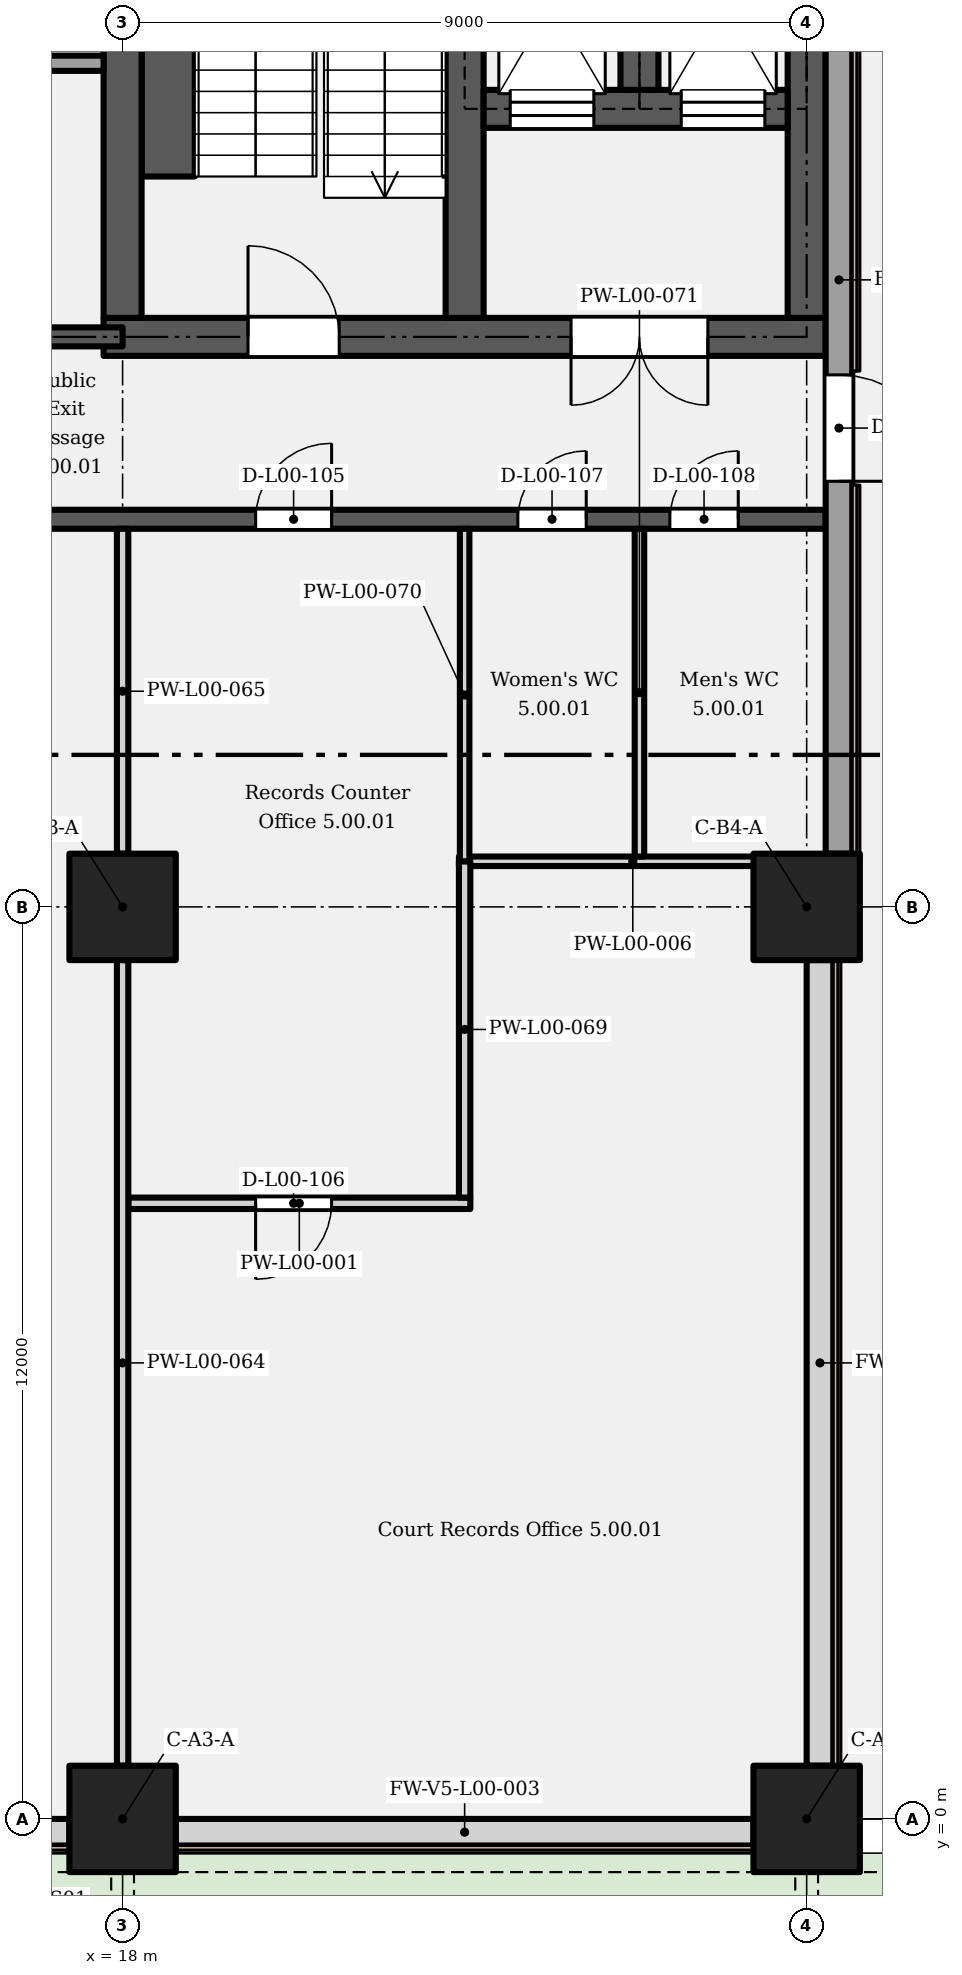
"""IFC4 building model, lengths in metres.
Left out: names, types, materials, properties, quantities, classifications, styles, units other than length and angle.
Written with IfcOpenShell. Run it as: python <this file> out.ifc"""

import sys

from ifc_helpers import new_model, si_unit, direction, frame, frame_2d, origin, origin_2d, place, context, subcontext, project, spatial, rectangle, extrude, element, fill, save


model = new_model("IFC4")
c1 = context("Model", 3, precision=1e-05, world=origin(), true_north=direction((0.0, 1.0)))
c2 = subcontext(c1, "Body", "Model", "MODEL_VIEW")
j1 = project(units=[si_unit("LENGTHUNIT", "METRE"), si_unit("PLANEANGLEUNIT", "RADIAN")], contexts=[c1])
p1 = place(None, origin())
s1 = spatial("IfcSite", under=j1, at=p1, CompositionType="ELEMENT")
p2 = place(p1, origin())
s2 = spatial("IfcBuilding", under=s1, at=p2, CompositionType="ELEMENT")
p3 = place(p2, origin())
s3 = spatial("IfcBuildingStorey", under=s2, at=p3, CompositionType="ELEMENT", Elevation=0.0)
for number, where, z_axis, x_axis in (
    (1, (18.0, 0.0, 0.0), (0.0, 0.0, 1.0), (1.0, 0.0, 0.0)),
    (2, (27.0, 0.0, 0.0), (0.0, 0.0, 1.0), (1.0, 0.0, 0.0)),
    (3, (18.0, 12.0, 0.0), (0.0, 0.0, 1.0), (1.0, 0.0, 0.0)),
    (4, (27.0, 12.0, 0.0), (0.0, 0.0, 1.0), (1.0, 0.0, 0.0)),
):
    element("IfcColumn", number, at=place(p3, frame(where, z_axis=z_axis, x_axis=x_axis)), inside=s3, PredefinedType="COLUMN", context=c2, shape_type="SweptSolid", body=[
        extrude(rectangle(XDim=1.4, YDim=1.4, at=origin_2d()), origin(), (0.0, 0.0, 1.0), 6.6),
    ])
p4 = place(p3, frame((17.75, 19.5, 0.0), z_axis=(0.0, 0.0, 1.0), x_axis=(1.0, 0.0, 0.0)))
e5 = element("IfcWall", 5, at=p4, inside=s3, PredefinedType="SHEAR", context=c2, shape_type="SweptSolid", body=[
    extrude(rectangle(XDim=9.5, YDim=0.5, at=frame_2d((4.75, 0.0))), origin(), (0.0, 0.0, 1.0), 6.3),
])
p5 = place(p4, frame((1.9, 0.0, 0.0)))
e6 = element("IfcOpeningElement", 6, at=p5, cuts=e5, PredefinedType="OPENING", context=c2, shape_type="SweptSolid", body=[
    extrude(rectangle(XDim=1.2, YDim=2.1, at=frame_2d((0.6, 1.05))), frame((0.0, 0.26, 0.0), z_axis=(0.0, -1.0, 0.0), x_axis=(1.0, 0.0, 0.0)), (0.0, 0.0, 1.0), 0.52),
])
p6 = place(p4, frame((7.95, 0.0, 0.0), z_axis=(0.0, 0.0, 1.0), x_axis=(-1.0, 0.0, 0.0)))
e7 = element("IfcOpeningElement", 7, at=p6, cuts=e5, PredefinedType="OPENING", context=c2, shape_type="SweptSolid", body=[
    extrude(rectangle(XDim=1.8, YDim=2.1, at=frame_2d((0.9, 1.05))), frame((0.0, 0.26, 0.0), z_axis=(0.0, -1.0, 0.0), x_axis=(1.0, 0.0, 0.0)), (0.0, 0.0, 1.0), 0.52),
])
p7 = place(p3, frame((18.0, 19.75, 0.0), z_axis=(0.0, 0.0, 1.0), x_axis=(0.0, 1.0, 0.0)))
e8 = element("IfcWall", 8, at=p7, inside=s3, PredefinedType="SHEAR", context=c2, shape_type="SweptSolid", body=[
    extrude(rectangle(XDim=8.05, YDim=0.5, at=frame_2d((4.025, 0.0))), origin(), (0.0, 0.0, 1.0), 6.3),
])
p8 = place(p3, frame((22.5, 19.75, 0.0), z_axis=(0.0, 0.0, 1.0), x_axis=(0.0, 1.0, 0.0)))
e9 = element("IfcWall", 9, at=p8, inside=s3, PredefinedType="SHEAR", context=c2, shape_type="SweptSolid", body=[
    extrude(rectangle(XDim=8.5, YDim=0.5, at=frame_2d((4.25, 0.0))), origin(), (0.0, 0.0, 1.0), 6.3),
])
p9 = place(p3, frame((27.0, 19.75, 0.0), z_axis=(0.0, 0.0, 1.0), x_axis=(0.0, 1.0, 0.0)))
e10 = element("IfcWall", 10, at=p9, inside=s3, PredefinedType="SHEAR", context=c2, shape_type="SweptSolid", body=[
    extrude(rectangle(XDim=8.05, YDim=0.5, at=frame_2d((4.025, 0.0))), origin(), (0.0, 0.0, 1.0), 6.3),
])
p10 = place(p3, frame((22.75, 22.5, 0.0), z_axis=(0.0, 0.0, 1.0), x_axis=(1.0, 0.0, 0.0)))
e11 = element("IfcWall", 11, at=p10, inside=s3, PredefinedType="SHEAR", context=c2, shape_type="SweptSolid", body=[
    extrude(rectangle(XDim=4.0, YDim=0.5, at=frame_2d((2.0, 0.0))), origin(), (0.0, 0.0, 1.0), 6.3),
])
p11 = place(p10, frame((0.35, 0.0, 0.0)))
e12 = element("IfcOpeningElement", 12, at=p11, cuts=e11, PredefinedType="OPENING", context=c2, shape_type="SweptSolid", body=[
    extrude(rectangle(XDim=1.1, YDim=2.1, at=frame_2d((0.55, 1.05))), frame((0.0, 0.26, 0.0), z_axis=(0.0, -1.0, 0.0), x_axis=(1.0, 0.0, 0.0)), (0.0, 0.0, 1.0), 0.52),
])
p12 = place(p10, frame((2.6, 0.0, 0.0)))
e13 = element("IfcOpeningElement", 13, at=p12, cuts=e11, PredefinedType="OPENING", context=c2, shape_type="SweptSolid", body=[
    extrude(rectangle(XDim=1.1, YDim=2.1, at=frame_2d((0.55, 1.05))), frame((0.0, 0.26, 0.0), z_axis=(0.0, -1.0, 0.0), x_axis=(1.0, 0.0, 0.0)), (0.0, 0.0, 1.0), 0.52),
])
p13 = place(p3, frame((24.8, 22.75, 0.0), z_axis=(0.0, 0.0, 1.0), x_axis=(0.0, 1.0, 0.0)))
e14 = element("IfcWall", 14, at=p13, inside=s3, PredefinedType="SHEAR", context=c2, shape_type="SweptSolid", body=[
    extrude(rectangle(XDim=5.5, YDim=0.5, at=frame_2d((2.75, 0.0))), origin(), (0.0, 0.0, 1.0), 6.3),
])
p14 = place(p3, frame((9.7, -0.175, 0.0), z_axis=(0.0, 0.0, 1.0), x_axis=(1.0, 0.0, 0.0)))
e15 = element("IfcWall", 15, at=p14, inside=s3, PredefinedType="SOLIDWALL", context=c2, shape_type="SweptSolid", body=[
    extrude(rectangle(XDim=7.6, YDim=0.35, at=frame_2d((3.8, 0.0))), origin(), (0.0, 0.0, 1.0), 6.3),
])
p15 = place(p14, frame((4.8, 0.0, 0.0), z_axis=(0.0, 0.0, 1.0), x_axis=(-1.0, 0.0, 0.0)))
e16 = element("IfcOpeningElement", 16, at=p15, cuts=e15, PredefinedType="OPENING", context=c2, shape_type="SweptSolid", body=[
    extrude(rectangle(XDim=2.0, YDim=2.1, at=frame_2d((1.0, 1.05))), frame((0.0, 0.185, 0.0), z_axis=(0.0, -1.0, 0.0), x_axis=(1.0, 0.0, 0.0)), (0.0, 0.0, 1.0), 0.37),
])
p16 = place(p14, frame((2.8, 0.0, 2.25)))
e17 = element("IfcOpeningElement", 17, at=p16, cuts=e15, PredefinedType="OPENING", context=c2, shape_type="SweptSolid", body=[
    extrude(rectangle(XDim=2.0, YDim=0.8, at=frame_2d((1.0, 0.4))), frame((0.0, 0.185, 0.0), z_axis=(0.0, -1.0, 0.0), x_axis=(1.0, 0.0, 0.0)), (0.0, 0.0, 1.0), 0.37),
])
p17 = place(p3, frame((18.7, -0.175, 0.0), z_axis=(0.0, 0.0, 1.0), x_axis=(1.0, 0.0, 0.0)))
e18 = element("IfcWall", 18, at=p17, inside=s3, PredefinedType="SOLIDWALL", context=c2, shape_type="SweptSolid", body=[
    extrude(rectangle(XDim=7.6, YDim=0.35, at=frame_2d((3.8, 0.0))), origin(), (0.0, 0.0, 1.0), 6.3),
])
p18 = place(p3, frame((27.175, 0.7, 0.0), z_axis=(0.0, 0.0, 1.0), x_axis=(0.0, 1.0, 0.0)))
e19 = element("IfcWall", 19, at=p18, inside=s3, PredefinedType="SOLIDWALL", context=c2, shape_type="SweptSolid", body=[
    extrude(rectangle(XDim=10.6, YDim=0.35, at=frame_2d((5.3, 0.0))), origin(), (0.0, 0.0, 1.0), 6.3),
])
p19 = place(p3, frame((27.425, 12.7, 0.0), z_axis=(0.0, 0.0, 1.0), x_axis=(0.0, 1.0, 0.0)))
e20 = element("IfcWall", 20, at=p19, inside=s3, PredefinedType="SOLIDWALL", context=c2, shape_type="SweptSolid", body=[
    extrude(rectangle(XDim=15.1, YDim=0.35, at=frame_2d((7.55, 0.0))), origin(), (0.0, 0.0, 1.0), 6.3),
])
p20 = place(p19, frame((6.3, 0.0, 0.0), z_axis=(0.0, 0.0, 1.0), x_axis=(-1.0, 0.0, 0.0)))
e21 = element("IfcOpeningElement", 21, at=p20, cuts=e20, PredefinedType="OPENING", context=c2, shape_type="SweptSolid", body=[
    extrude(rectangle(XDim=1.4, YDim=2.1, at=frame_2d((0.7, 1.05))), frame((0.0, 0.185, 0.0), z_axis=(0.0, -1.0, 0.0), x_axis=(1.0, 0.0, 0.0)), (0.0, 0.0, 1.0), 0.37),
])
p21 = place(p3, frame((18.075, 8.1, 0.0), z_axis=(0.0, 0.0, 1.0), x_axis=(1.0, 0.0, 0.0)))
e22 = element("IfcWall", 22, at=p21, inside=s3, PredefinedType="PARTITIONING", context=c2, shape_type="SweptSolid", body=[
    extrude(rectangle(XDim=4.5, YDim=0.15, at=frame_2d((2.25, 0.0))), origin(), (0.0, 0.0, 1.0), 6.3),
])
p22 = place(p21, frame((2.675, 0.0, 0.0), z_axis=(0.0, 0.0, 1.0), x_axis=(-1.0, 0.0, 0.0)))
e23 = element("IfcOpeningElement", 23, at=p22, cuts=e22, PredefinedType="OPENING", context=c2, shape_type="SweptSolid", body=[
    extrude(rectangle(XDim=1.0, YDim=2.1, at=frame_2d((0.5, 1.05))), frame((0.0, 0.085, 0.0), z_axis=(0.0, -1.0, 0.0), x_axis=(1.0, 0.0, 0.0)), (0.0, 0.0, 1.0), 0.17),
])
p23 = place(p3, frame((22.425, 12.6, 0.0), z_axis=(0.0, 0.0, 1.0), x_axis=(1.0, 0.0, 0.0)))
e24 = element("IfcWall", 24, at=p23, inside=s3, PredefinedType="PARTITIONING", context=c2, shape_type="SweptSolid", body=[
    extrude(rectangle(XDim=4.575, YDim=0.125, at=frame_2d((2.288, 0.0))), origin(), (0.0, 0.0, 1.0), 6.3),
])
p24 = place(p3, frame((-0.25, 17.1, 0.0), z_axis=(0.0, 0.0, 1.0), x_axis=(1.0, 0.0, 0.0)))
e25 = element("IfcWall", 25, at=p24, inside=s3, PredefinedType="SHEAR", context=c2, shape_type="SweptSolid", body=[
    extrude(rectangle(XDim=27.5, YDim=0.25, at=frame_2d((13.75, 0.0))), origin(), (0.0, 0.0, 1.0), 6.3),
])
p25 = place(p24, frame((4.15, 0.0, 0.0)))
e26 = element("IfcOpeningElement", 26, at=p25, cuts=e25, PredefinedType="OPENING", context=c2, shape_type="SweptSolid", body=[
    extrude(rectangle(XDim=1.2, YDim=2.1, at=frame_2d((0.6, 1.05))), frame((0.0, 0.135, 0.0), z_axis=(0.0, -1.0, 0.0), x_axis=(1.0, 0.0, 0.0)), (0.0, 0.0, 1.0), 0.27),
])
p26 = place(p24, frame((14.25, 0.0, 0.0)))
e27 = element("IfcOpeningElement", 27, at=p26, cuts=e25, PredefinedType="OPENING", context=c2, shape_type="SweptSolid", body=[
    extrude(rectangle(XDim=2.0, YDim=2.1, at=frame_2d((1.0, 1.05))), frame((0.0, 0.135, 0.0), z_axis=(0.0, -1.0, 0.0), x_axis=(1.0, 0.0, 0.0)), (0.0, 0.0, 1.0), 0.27),
])
p27 = place(p24, frame((20.0, 0.0, 0.0)))
e28 = element("IfcOpeningElement", 28, at=p27, cuts=e25, PredefinedType="OPENING", context=c2, shape_type="SweptSolid", body=[
    extrude(rectangle(XDim=1.0, YDim=2.1, at=frame_2d((0.5, 1.05))), frame((0.0, 0.135, 0.0), z_axis=(0.0, -1.0, 0.0), x_axis=(1.0, 0.0, 0.0)), (0.0, 0.0, 1.0), 0.27),
])
p28 = place(p24, frame((23.45, 0.0, 0.0)))
e29 = element("IfcOpeningElement", 29, at=p28, cuts=e25, PredefinedType="OPENING", context=c2, shape_type="SweptSolid", body=[
    extrude(rectangle(XDim=0.9, YDim=2.1, at=frame_2d((0.45, 1.05))), frame((0.0, 0.135, 0.0), z_axis=(0.0, -1.0, 0.0), x_axis=(1.0, 0.0, 0.0)), (0.0, 0.0, 1.0), 0.27),
])
p29 = place(p24, frame((25.45, 0.0, 0.0)))
e30 = element("IfcOpeningElement", 30, at=p29, cuts=e25, PredefinedType="OPENING", context=c2, shape_type="SweptSolid", body=[
    extrude(rectangle(XDim=0.9, YDim=2.1, at=frame_2d((0.45, 1.05))), frame((0.0, 0.135, 0.0), z_axis=(0.0, -1.0, 0.0), x_axis=(1.0, 0.0, 0.0)), (0.0, 0.0, 1.0), 0.27),
])
p30 = place(p3, frame((9.0, 19.5, 0.0), z_axis=(0.0, 0.0, 1.0), x_axis=(1.0, 0.0, 0.0)))
e31 = element("IfcWall", 31, at=p30, inside=s3, PredefinedType="SHEAR", context=c2, shape_type="SweptSolid", body=[
    extrude(rectangle(XDim=9.0, YDim=0.25, at=frame_2d((4.5, 0.0))), origin(), (0.0, 0.0, 1.0), 6.3),
])
p31 = place(p30, frame((2.0, 0.0, 0.0), z_axis=(0.0, 0.0, 1.0), x_axis=(-1.0, 0.0, 0.0)))
e32 = element("IfcOpeningElement", 32, at=p31, cuts=e31, PredefinedType="OPENING", context=c2, shape_type="SweptSolid", body=[
    extrude(rectangle(XDim=1.0, YDim=2.1, at=frame_2d((0.5, 1.05))), frame((0.0, 0.135, 0.0), z_axis=(0.0, -1.0, 0.0), x_axis=(1.0, 0.0, 0.0)), (0.0, 0.0, 1.0), 0.27),
])
p32 = place(p30, frame((7.25, 0.0, 0.0), z_axis=(0.0, 0.0, 1.0), x_axis=(-1.0, 0.0, 0.0)))
e33 = element("IfcOpeningElement", 33, at=p32, cuts=e31, PredefinedType="OPENING", context=c2, shape_type="SweptSolid", body=[
    extrude(rectangle(XDim=1.0, YDim=2.1, at=frame_2d((0.5, 1.05))), frame((0.0, 0.135, 0.0), z_axis=(0.0, -1.0, 0.0), x_axis=(1.0, 0.0, 0.0)), (0.0, 0.0, 1.0), 0.27),
])
p33 = place(p3, frame((13.4, 23.1, 0.0), z_axis=(0.0, 0.0, 1.0), x_axis=(1.0, 0.0, 0.0)))
e34 = element("IfcWall", 34, at=p33, inside=s3, PredefinedType="PARTITIONING", context=c2, shape_type="SweptSolid", body=[
    extrude(rectangle(XDim=4.35, YDim=0.2, at=frame_2d((2.175, 0.0))), origin(), (0.0, 0.0, 1.0), 6.3),
])
p34 = place(p3, frame((18.0, 0.7, 0.0), z_axis=(0.0, 0.0, 1.0), x_axis=(0.0, 1.0, 0.0)))
e35 = element("IfcWall", 35, at=p34, inside=s3, PredefinedType="PARTITIONING", context=c2, shape_type="SweptSolid", body=[
    extrude(rectangle(XDim=10.6, YDim=0.15, at=frame_2d((5.3, 0.0))), origin(), (0.0, 0.0, 1.0), 5.55),
])
p35 = place(p3, frame((18.0, 12.7, 0.0), z_axis=(0.0, 0.0, 1.0), x_axis=(0.0, 1.0, 0.0)))
e36 = element("IfcWall", 36, at=p35, inside=s3, PredefinedType="PARTITIONING", context=c2, shape_type="SweptSolid", body=[
    extrude(rectangle(XDim=4.275, YDim=0.15, at=frame_2d((2.138, 0.0))), origin(), (0.0, 0.0, 1.0), 5.35),
])
p36 = place(p3, frame((22.5, 8.175, 0.0), z_axis=(0.0, 0.0, 1.0), x_axis=(0.0, 1.0, 0.0)))
e37 = element("IfcWall", 37, at=p36, inside=s3, PredefinedType="PARTITIONING", context=c2, shape_type="SweptSolid", body=[
    extrude(rectangle(XDim=4.425, YDim=0.15, at=frame_2d((2.212, 0.0))), origin(), (0.0, 0.0, 1.0), 6.3),
])
p37 = place(p3, frame((22.5, 12.6, 0.0), z_axis=(0.0, 0.0, 1.0), x_axis=(0.0, 1.0, 0.0)))
e38 = element("IfcWall", 38, at=p37, inside=s3, PredefinedType="PARTITIONING", context=c2, shape_type="SweptSolid", body=[
    extrude(rectangle(XDim=4.375, YDim=0.125, at=frame_2d((2.188, 0.0))), origin(), (0.0, 0.0, 1.0), 6.3),
])
p38 = place(p3, frame((24.8, 12.663, 0.0), z_axis=(0.0, 0.0, 1.0), x_axis=(0.0, 1.0, 0.0)))
e39 = element("IfcWall", 39, at=p38, inside=s3, PredefinedType="PARTITIONING", context=c2, shape_type="SweptSolid", body=[
    extrude(rectangle(XDim=4.312, YDim=0.125, at=frame_2d((2.156, 0.0))), origin(), (0.0, 0.0, 1.0), 6.3),
])
p39 = place(p3, frame((18.6, 21.61, 0.0), z_axis=(0.0, 0.0, 1.0), x_axis=(0.0, 1.0, 0.0)))
e40 = element("IfcWall", 40, at=p39, inside=s3, PredefinedType="SHEAR", context=c2, shape_type="SweptSolid", body=[
    extrude(rectangle(XDim=6.14, YDim=0.7, at=frame_2d((3.07, 0.0))), origin(), (0.0, 0.0, 1.0), 3.1),
])
p40 = place(p20, origin())
e41 = element("IfcDoor", 41, at=p40, inside=s3, OperationType="SINGLE_SWING_LEFT", PredefinedType="DOOR", context=c2, shape_type="SweptSolid", body=[
    extrude(rectangle(XDim=1.4, YDim=2.1, at=frame_2d((0.7, 1.05))), frame((0.0, 0.025, 0.0), z_axis=(0.0, -1.0, 0.0), x_axis=(1.0, 0.0, 0.0)), (0.0, 0.0, 1.0), 0.05),
])
fill(e21, e41)
p41 = place(p5, origin())
e42 = element("IfcDoor", 42, at=p41, inside=s3, OperationType="SINGLE_SWING_LEFT", PredefinedType="DOOR", context=c2, shape_type="SweptSolid", body=[
    extrude(rectangle(XDim=1.2, YDim=2.1, at=frame_2d((0.6, 1.05))), frame((0.0, 0.025, 0.0), z_axis=(0.0, -1.0, 0.0), x_axis=(1.0, 0.0, 0.0)), (0.0, 0.0, 1.0), 0.05),
])
fill(e6, e42)
p42 = place(p6, origin())
e43 = element("IfcDoor", 43, at=p42, inside=s3, OperationType="DOUBLE_DOOR_SINGLE_SWING", PredefinedType="DOOR", context=c2, shape_type="SweptSolid", body=[
    extrude(rectangle(XDim=1.8, YDim=2.1, at=frame_2d((0.9, 1.05))), frame((0.0, 0.025, 0.0), z_axis=(0.0, -1.0, 0.0), x_axis=(1.0, 0.0, 0.0)), (0.0, 0.0, 1.0), 0.05),
])
fill(e7, e43)
p43 = place(p11, origin())
e44 = element("IfcDoor", 44, at=p43, inside=s3, OperationType="SLIDING_TO_LEFT", PredefinedType="DOOR", context=c2, shape_type="SweptSolid", body=[
    extrude(rectangle(XDim=1.1, YDim=2.1, at=frame_2d((0.55, 1.05))), frame((0.0, 0.025, 0.0), z_axis=(0.0, -1.0, 0.0), x_axis=(1.0, 0.0, 0.0)), (0.0, 0.0, 1.0), 0.05),
])
fill(e12, e44)
p44 = place(p12, origin())
e45 = element("IfcDoor", 45, at=p44, inside=s3, OperationType="SLIDING_TO_LEFT", PredefinedType="DOOR", context=c2, shape_type="SweptSolid", body=[
    extrude(rectangle(XDim=1.1, YDim=2.1, at=frame_2d((0.55, 1.05))), frame((0.0, 0.025, 0.0), z_axis=(0.0, -1.0, 0.0), x_axis=(1.0, 0.0, 0.0)), (0.0, 0.0, 1.0), 0.05),
])
fill(e13, e45)
p45 = place(p27, origin())
e46 = element("IfcDoor", 46, at=p45, inside=s3, OperationType="SINGLE_SWING_RIGHT", PredefinedType="DOOR", context=c2, shape_type="SweptSolid", body=[
    extrude(rectangle(XDim=1.0, YDim=2.1, at=frame_2d((0.5, 1.05))), frame((0.0, 0.025, 0.0), z_axis=(0.0, -1.0, 0.0), x_axis=(1.0, 0.0, 0.0)), (0.0, 0.0, 1.0), 0.05),
])
fill(e28, e46)
p46 = place(p22, origin())
e47 = element("IfcDoor", 47, at=p46, inside=s3, OperationType="SINGLE_SWING_RIGHT", PredefinedType="DOOR", context=c2, shape_type="SweptSolid", body=[
    extrude(rectangle(XDim=1.0, YDim=2.1, at=frame_2d((0.5, 1.05))), frame((0.0, 0.025, 0.0), z_axis=(0.0, -1.0, 0.0), x_axis=(1.0, 0.0, 0.0)), (0.0, 0.0, 1.0), 0.05),
])
fill(e23, e47)
p47 = place(p28, origin())
e48 = element("IfcDoor", 48, at=p47, inside=s3, OperationType="SINGLE_SWING_RIGHT", PredefinedType="DOOR", context=c2, shape_type="SweptSolid", body=[
    extrude(rectangle(XDim=0.9, YDim=2.1, at=frame_2d((0.45, 1.05))), frame((0.0, 0.025, 0.0), z_axis=(0.0, -1.0, 0.0), x_axis=(1.0, 0.0, 0.0)), (0.0, 0.0, 1.0), 0.05),
])
fill(e29, e48)
p48 = place(p29, origin())
e49 = element("IfcDoor", 49, at=p48, inside=s3, OperationType="SINGLE_SWING_RIGHT", PredefinedType="DOOR", context=c2, shape_type="SweptSolid", body=[
    extrude(rectangle(XDim=0.9, YDim=2.1, at=frame_2d((0.45, 1.05))), frame((0.0, 0.025, 0.0), z_axis=(0.0, -1.0, 0.0), x_axis=(1.0, 0.0, 0.0)), (0.0, 0.0, 1.0), 0.05),
])
fill(e30, e49)
save(model, sys.argv[1])
